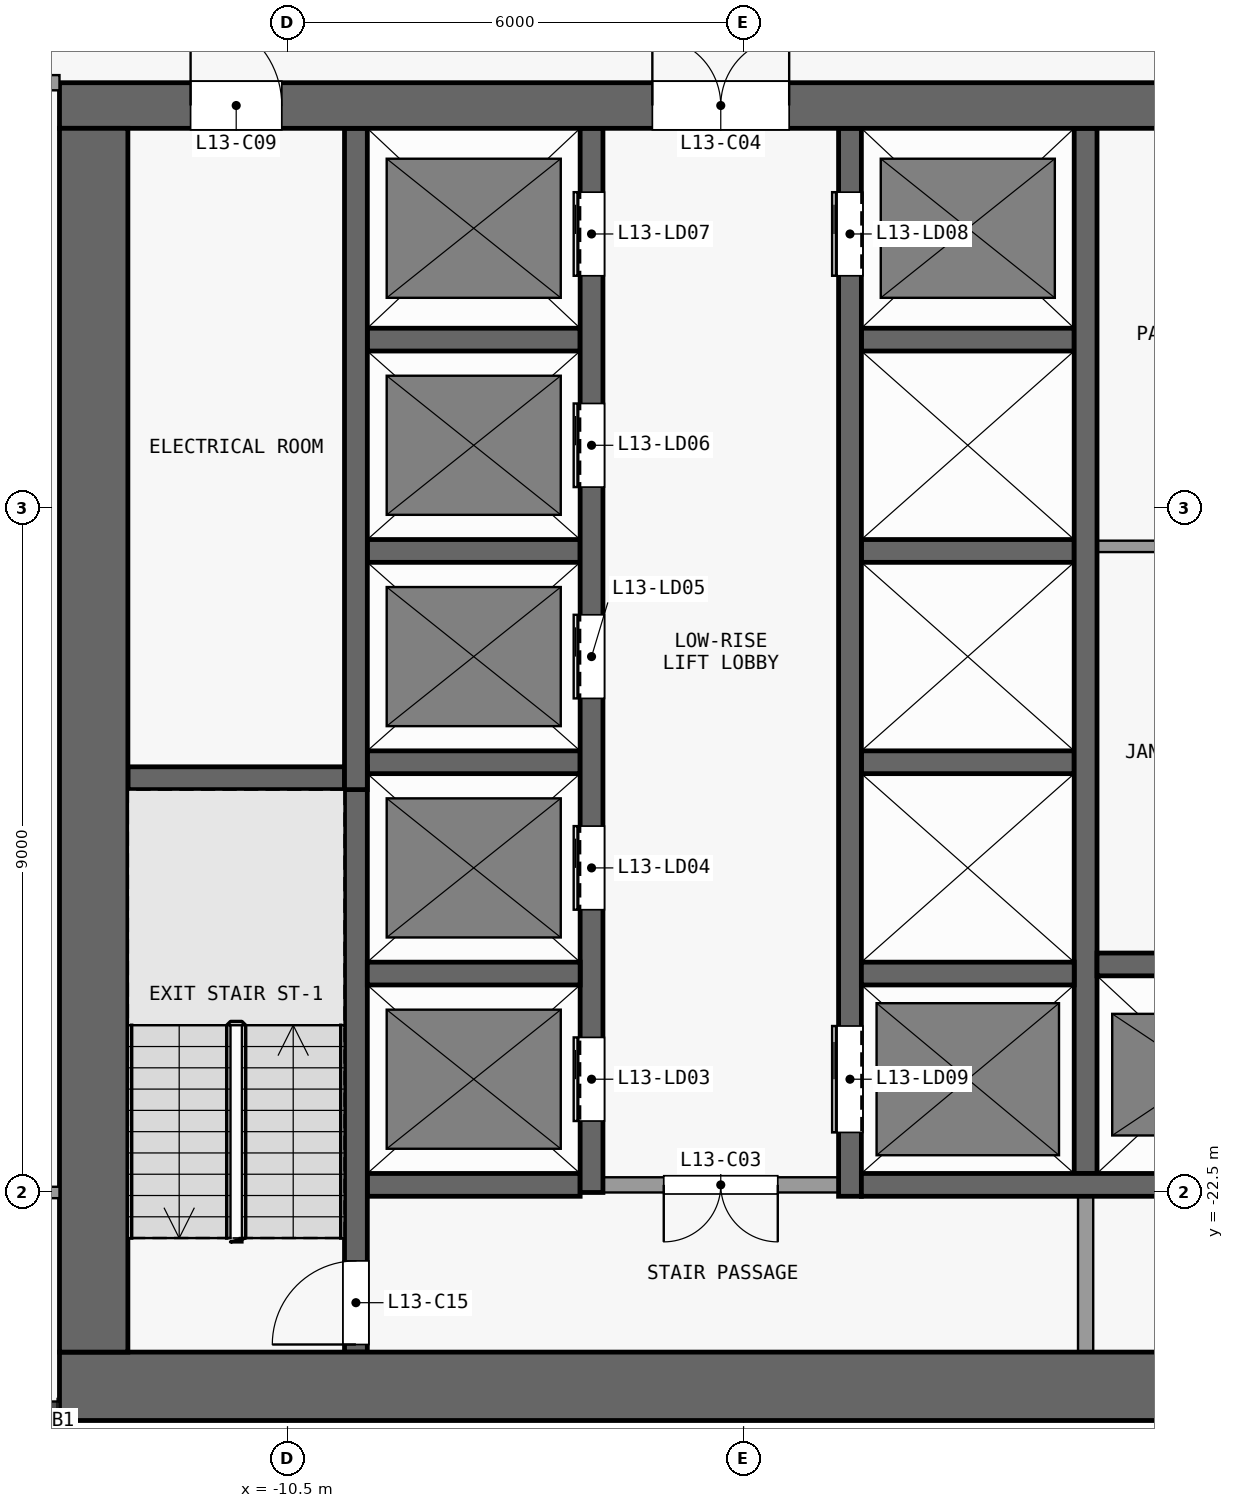
"""IFC4 building model, lengths in metres.
Left out: names, types, materials, properties, quantities, classifications, styles, units other than length and angle.
Written with IfcOpenShell. Run it as: python <this file> out.ifc"""

import sys

from ifc_helpers import new_model, si_unit, direction, frame, frame_2d, origin, place, context, subcontext, project, spatial, rectangle, extrude, element, fill, save


model = new_model("IFC4")
c1 = context("Model", 3, precision=1e-05, world=origin(), true_north=direction((0.0, 1.0)))
c2 = subcontext(c1, "Body", "Model", "MODEL_VIEW")
j1 = project(units=[si_unit("LENGTHUNIT", "METRE"), si_unit("PLANEANGLEUNIT", "RADIAN")], contexts=[c1])
p1 = place(None, origin())
s1 = spatial("IfcSite", under=j1, at=p1, CompositionType="ELEMENT")
p2 = place(p1, origin())
s2 = spatial("IfcBuilding", under=s1, at=p2, CompositionType="ELEMENT")
p3 = place(p2, frame((0.0, 0.0, 57.7)))
s3 = spatial("IfcBuildingStorey", under=s2, at=p3, CompositionType="ELEMENT", Elevation=57.7)
p4 = place(p3, frame((-13.5, -25.05, 0.0), z_axis=(0.0, 0.0, 1.0), x_axis=(1.0, 0.0, 0.0)))
e1 = element("IfcWall", 1, at=p4, inside=s3, PredefinedType="SHEAR", context=c2, shape_type="SweptSolid", body=[
    extrude(rectangle(XDim=27.0, YDim=0.9, at=frame_2d((13.5, 0.0))), origin(), (0.0, 0.0, 1.0), 3.3),
])
p5 = place(p3, frame((-13.5, -8.2, 0.0), z_axis=(0.0, 0.0, 1.0), x_axis=(1.0, 0.0, 0.0)))
e2 = element("IfcWall", 2, at=p5, inside=s3, PredefinedType="SHEAR", context=c2, shape_type="SweptSolid", body=[
    extrude(rectangle(XDim=27.0, YDim=0.6, at=frame_2d((13.5, 0.0))), origin(), (0.0, 0.0, 1.0), 3.3),
])
p6 = place(p5, frame((7.8, 0.0, 0.0)))
e3 = element("IfcOpeningElement", 3, at=p6, cuts=e2, PredefinedType="OPENING", context=c2, shape_type="SweptSolid", body=[
    extrude(rectangle(XDim=1.8, YDim=2.1, at=frame_2d((0.9, 1.05))), frame((0.0, 0.31, 0.0), z_axis=(0.0, -1.0, 0.0), x_axis=(1.0, 0.0, 0.0)), (0.0, 0.0, 1.0), 0.62),
])
p7 = place(p5, frame((17.4, 0.0, 0.0)))
e4 = element("IfcOpeningElement", 4, at=p7, cuts=e2, PredefinedType="OPENING", context=c2, shape_type="SweptSolid", body=[
    extrude(rectangle(XDim=1.8, YDim=2.1, at=frame_2d((0.9, 1.05))), frame((0.0, 0.31, 0.0), z_axis=(0.0, -1.0, 0.0), x_axis=(1.0, 0.0, 0.0)), (0.0, 0.0, 1.0), 0.62),
])
p8 = place(p5, frame((1.725, 0.0, 0.0)))
e5 = element("IfcOpeningElement", 5, at=p8, cuts=e2, PredefinedType="OPENING", context=c2, shape_type="SweptSolid", body=[
    extrude(rectangle(XDim=1.2, YDim=2.1, at=frame_2d((0.6, 1.05))), frame((0.0, 0.31, 0.0), z_axis=(0.0, -1.0, 0.0), x_axis=(1.0, 0.0, 0.0)), (0.0, 0.0, 1.0), 0.62),
])
p9 = place(p5, frame((23.375, 0.0, 0.0)))
e6 = element("IfcOpeningElement", 6, at=p9, cuts=e2, PredefinedType="OPENING", context=c2, shape_type="SweptSolid", body=[
    extrude(rectangle(XDim=0.9, YDim=2.1, at=frame_2d((0.45, 1.05))), frame((0.0, 0.31, 0.0), z_axis=(0.0, -1.0, 0.0), x_axis=(1.0, 0.0, 0.0)), (0.0, 0.0, 1.0), 0.62),
])
p10 = place(p3, frame((-13.05, -24.6, 0.0), z_axis=(0.0, 0.0, 1.0), x_axis=(0.0, 1.0, 0.0)))
e7 = element("IfcWall", 7, at=p10, inside=s3, PredefinedType="SHEAR", context=c2, shape_type="SweptSolid", body=[
    extrude(rectangle(XDim=16.1, YDim=0.9, at=frame_2d((8.05, 0.0))), origin(), (0.0, 0.0, 1.0), 3.3),
])
p11 = place(p3, frame((-9.45, -22.4, 0.0), z_axis=(0.0, 0.0, 1.0), x_axis=(1.0, 0.0, 0.0)))
e8 = element("IfcWall", 8, at=p11, inside=s3, PredefinedType="SHEAR", context=c2, shape_type="SweptSolid", body=[
    extrude(rectangle(XDim=2.8, YDim=0.3, at=frame_2d((1.4, 0.0))), origin(), (0.0, 0.0, 1.0), 3.3),
])
p12 = place(p3, frame((-3.25, -22.4, 0.0), z_axis=(0.0, 0.0, 1.0), x_axis=(-1.0, 0.0, 0.0)))
e9 = element("IfcWall", 9, at=p12, inside=s3, PredefinedType="PARTITIONING", context=c2, shape_type="SweptSolid", body=[
    extrude(rectangle(XDim=3.1, YDim=0.2, at=frame_2d((1.55, 0.0))), origin(), (0.0, 0.0, 1.0), 3.3),
])
p13 = place(p12, frame((0.8, 0.0, 0.0)))
e10 = element("IfcOpeningElement", 10, at=p13, cuts=e9, PredefinedType="OPENING", context=c2, shape_type="SweptSolid", body=[
    extrude(rectangle(XDim=1.5, YDim=2.1, at=frame_2d((0.75, 1.05))), frame((0.0, 0.11, 0.0), z_axis=(0.0, -1.0, 0.0), x_axis=(1.0, 0.0, 0.0)), (0.0, 0.0, 1.0), 0.22),
])
p14 = place(p3, frame((-2.95, -22.4, 0.0), z_axis=(0.0, 0.0, 1.0), x_axis=(1.0, 0.0, 0.0)))
e11 = element("IfcWall", 11, at=p14, inside=s3, PredefinedType="SHEAR", context=c2, shape_type="SweptSolid", body=[
    extrude(rectangle(XDim=6.2, YDim=0.3, at=frame_2d((3.1, 0.0))), origin(), (0.0, 0.0, 1.0), 3.3),
])
for number, where, z_axis, x_axis in (
    (12, (-9.45, -19.62, 0.0), (0.0, 0.0, 1.0), (1.0, 0.0, 0.0)),
    (13, (-2.95, -19.62, 0.0), (0.0, 0.0, 1.0), (1.0, 0.0, 0.0)),
):
    element("IfcWall", number, at=place(p3, frame(where, z_axis=z_axis, x_axis=x_axis)), inside=s3, PredefinedType="SHEAR", context=c2, shape_type="SweptSolid", body=[
        extrude(rectangle(XDim=2.8, YDim=0.3, at=frame_2d((1.4, 0.0))), origin(), (0.0, 0.0, 1.0), 3.3),
    ])
p15 = place(p3, frame((0.15, -19.5, 0.0), z_axis=(0.0, 0.0, 1.0), x_axis=(1.0, 0.0, 0.0)))
e14 = element("IfcWall", 14, at=p15, inside=s3, PredefinedType="SHEAR", context=c2, shape_type="SweptSolid", body=[
    extrude(rectangle(XDim=3.025, YDim=0.3, at=frame_2d((1.513, 0.0))), origin(), (0.0, 0.0, 1.0), 3.3),
])
p16 = place(p3, frame((-12.6, -17.05, 0.0), z_axis=(0.0, 0.0, 1.0), x_axis=(1.0, 0.0, 0.0)))
e15 = element("IfcWall", 15, at=p16, inside=s3, PredefinedType="SHEAR", context=c2, shape_type="SweptSolid", body=[
    extrude(rectangle(XDim=2.85, YDim=0.3, at=frame_2d((1.425, 0.0))), origin(), (0.0, 0.0, 1.0), 3.3),
])
for number, where, z_axis, x_axis in (
    (16, (-9.45, -16.84, 0.0), (0.0, 0.0, 1.0), (1.0, 0.0, 0.0)),
    (17, (-2.95, -16.84, 0.0), (0.0, 0.0, 1.0), (1.0, 0.0, 0.0)),
    (18, (-9.45, -14.06, 0.0), (0.0, 0.0, 1.0), (1.0, 0.0, 0.0)),
    (19, (-2.95, -14.06, 0.0), (0.0, 0.0, 1.0), (1.0, 0.0, 0.0)),
):
    element("IfcWall", number, at=place(p3, frame(where, z_axis=z_axis, x_axis=x_axis)), inside=s3, PredefinedType="SHEAR", context=c2, shape_type="SweptSolid", body=[
        extrude(rectangle(XDim=2.8, YDim=0.3, at=frame_2d((1.4, 0.0))), origin(), (0.0, 0.0, 1.0), 3.3),
    ])
p17 = place(p3, frame((0.15, -14.0, 0.0), z_axis=(0.0, 0.0, 1.0), x_axis=(1.0, 0.0, 0.0)))
e20 = element("IfcWall", 20, at=p17, inside=s3, PredefinedType="PARTITIONING", context=c2, shape_type="SweptSolid", body=[
    extrude(rectangle(XDim=2.875, YDim=0.15, at=frame_2d((1.438, 0.0))), origin(), (0.0, 0.0, 1.0), 3.3),
])
for number, where, z_axis, x_axis in (
    (21, (-9.45, -11.28, 0.0), (0.0, 0.0, 1.0), (1.0, 0.0, 0.0)),
    (22, (-2.95, -11.28, 0.0), (0.0, 0.0, 1.0), (1.0, 0.0, 0.0)),
):
    element("IfcWall", number, at=place(p3, frame(where, z_axis=z_axis, x_axis=x_axis)), inside=s3, PredefinedType="SHEAR", context=c2, shape_type="SweptSolid", body=[
        extrude(rectangle(XDim=2.8, YDim=0.3, at=frame_2d((1.4, 0.0))), origin(), (0.0, 0.0, 1.0), 3.3),
    ])
p18 = place(p3, frame((-9.6, -24.6, 0.0), z_axis=(0.0, 0.0, 1.0), x_axis=(0.0, 1.0, 0.0)))
e23 = element("IfcWall", 23, at=p18, inside=s3, PredefinedType="SHEAR", context=c2, shape_type="SweptSolid", body=[
    extrude(rectangle(XDim=7.7, YDim=0.3, at=frame_2d((3.85, 0.0))), origin(), (0.0, 0.0, 1.0), 3.3),
])
p19 = place(p18, frame((0.1, 0.0, 0.0)))
e24 = element("IfcOpeningElement", 24, at=p19, cuts=e23, PredefinedType="OPENING", context=c2, shape_type="SweptSolid", body=[
    extrude(rectangle(XDim=1.1, YDim=2.1, at=frame_2d((0.55, 1.05))), frame((0.0, 0.16, 0.0), z_axis=(0.0, -1.0, 0.0), x_axis=(1.0, 0.0, 0.0)), (0.0, 0.0, 1.0), 0.32),
])
p20 = place(p3, frame((-9.6, -17.2, 0.0), z_axis=(0.0, 0.0, 1.0), x_axis=(0.0, 1.0, 0.0)))
e25 = element("IfcWall", 25, at=p20, inside=s3, PredefinedType="SHEAR", context=c2, shape_type="SweptSolid", body=[
    extrude(rectangle(XDim=8.7, YDim=0.3, at=frame_2d((4.35, 0.0))), origin(), (0.0, 0.0, 1.0), 3.3),
])
p21 = place(p3, frame((-6.5, -22.5, 0.0), z_axis=(0.0, 0.0, 1.0), x_axis=(0.0, 1.0, 0.0)))
e26 = element("IfcWall", 26, at=p21, inside=s3, PredefinedType="SHEAR", context=c2, shape_type="SweptSolid", body=[
    extrude(rectangle(XDim=14.0, YDim=0.3, at=frame_2d((7.0, 0.0))), origin(), (0.0, 0.0, 1.0), 3.3),
])
p22 = place(p21, frame((0.94, 0.0, 0.0)))
e27 = element("IfcOpeningElement", 27, at=p22, cuts=e26, PredefinedType="OPENING", context=c2, shape_type="SweptSolid", body=[
    extrude(rectangle(XDim=1.1, YDim=2.1, at=frame_2d((0.55, 1.05))), frame((0.0, 0.16, 0.0), z_axis=(0.0, -1.0, 0.0), x_axis=(1.0, 0.0, 0.0)), (0.0, 0.0, 1.0), 0.32),
])
p23 = place(p21, frame((3.72, 0.0, 0.0)))
e28 = element("IfcOpeningElement", 28, at=p23, cuts=e26, PredefinedType="OPENING", context=c2, shape_type="SweptSolid", body=[
    extrude(rectangle(XDim=1.1, YDim=2.1, at=frame_2d((0.55, 1.05))), frame((0.0, 0.16, 0.0), z_axis=(0.0, -1.0, 0.0), x_axis=(1.0, 0.0, 0.0)), (0.0, 0.0, 1.0), 0.32),
])
p24 = place(p21, frame((6.5, 0.0, 0.0)))
e29 = element("IfcOpeningElement", 29, at=p24, cuts=e26, PredefinedType="OPENING", context=c2, shape_type="SweptSolid", body=[
    extrude(rectangle(XDim=1.1, YDim=2.1, at=frame_2d((0.55, 1.05))), frame((0.0, 0.16, 0.0), z_axis=(0.0, -1.0, 0.0), x_axis=(1.0, 0.0, 0.0)), (0.0, 0.0, 1.0), 0.32),
])
p25 = place(p21, frame((9.28, 0.0, 0.0)))
e30 = element("IfcOpeningElement", 30, at=p25, cuts=e26, PredefinedType="OPENING", context=c2, shape_type="SweptSolid", body=[
    extrude(rectangle(XDim=1.1, YDim=2.1, at=frame_2d((0.55, 1.05))), frame((0.0, 0.16, 0.0), z_axis=(0.0, -1.0, 0.0), x_axis=(1.0, 0.0, 0.0)), (0.0, 0.0, 1.0), 0.32),
])
p26 = place(p21, frame((12.06, 0.0, 0.0)))
e31 = element("IfcOpeningElement", 31, at=p26, cuts=e26, PredefinedType="OPENING", context=c2, shape_type="SweptSolid", body=[
    extrude(rectangle(XDim=1.1, YDim=2.1, at=frame_2d((0.55, 1.05))), frame((0.0, 0.16, 0.0), z_axis=(0.0, -1.0, 0.0), x_axis=(1.0, 0.0, 0.0)), (0.0, 0.0, 1.0), 0.32),
])
p27 = place(p3, frame((-3.1, -22.55, 0.0), z_axis=(0.0, 0.0, 1.0), x_axis=(0.0, 1.0, 0.0)))
e32 = element("IfcWall", 32, at=p27, inside=s3, PredefinedType="SHEAR", context=c2, shape_type="SweptSolid", body=[
    extrude(rectangle(XDim=14.05, YDim=0.3, at=frame_2d((7.025, 0.0))), origin(), (0.0, 0.0, 1.0), 3.3),
])
p28 = place(p27, frame((12.11, 0.0, 0.0)))
e33 = element("IfcOpeningElement", 33, at=p28, cuts=e32, PredefinedType="OPENING", context=c2, shape_type="SweptSolid", body=[
    extrude(rectangle(XDim=1.1, YDim=2.1, at=frame_2d((0.55, 1.05))), frame((0.0, 0.16, 0.0), z_axis=(0.0, -1.0, 0.0), x_axis=(1.0, 0.0, 0.0)), (0.0, 0.0, 1.0), 0.32),
])
p29 = place(p27, frame((0.84, 0.0, 0.0)))
e34 = element("IfcOpeningElement", 34, at=p29, cuts=e32, PredefinedType="OPENING", context=c2, shape_type="SweptSolid", body=[
    extrude(rectangle(XDim=1.4, YDim=2.1, at=frame_2d((0.7, 1.05))), frame((0.0, 0.16, 0.0), z_axis=(0.0, -1.0, 0.0), x_axis=(1.0, 0.0, 0.0)), (0.0, 0.0, 1.0), 0.32),
])
p30 = place(p3, frame((0.0, -24.6, 0.0), z_axis=(0.0, 0.0, 1.0), x_axis=(0.0, 1.0, 0.0)))
e35 = element("IfcWall", 35, at=p30, inside=s3, PredefinedType="PARTITIONING", context=c2, shape_type="SweptSolid", body=[
    extrude(rectangle(XDim=2.05, YDim=0.2, at=frame_2d((1.025, 0.0))), origin(), (0.0, 0.0, 1.0), 3.3),
])
p31 = place(p3, frame((0.0, -22.25, 0.0), z_axis=(0.0, 0.0, 1.0), x_axis=(0.0, 1.0, 0.0)))
e36 = element("IfcWall", 36, at=p31, inside=s3, PredefinedType="SHEAR", context=c2, shape_type="SweptSolid", body=[
    extrude(rectangle(XDim=13.75, YDim=0.3, at=frame_2d((6.875, 0.0))), origin(), (0.0, 0.0, 1.0), 3.3),
])
p32 = place(p3, frame((-16.425, -22.5, 0.0), z_axis=(0.0, 0.0, 1.0), x_axis=(1.0, 0.0, 0.0)))
e37 = element("IfcWall", 37, at=p32, inside=s3, PredefinedType="PARTITIONING", context=c2, shape_type="SweptSolid", body=[
    extrude(rectangle(XDim=2.925, YDim=0.15, at=frame_2d((1.462, 0.0))), origin(), (0.0, 0.0, 1.0), 3.3),
])
p33 = place(p32, frame((1.0, 0.0, 0.0)))
e38 = element("IfcOpeningElement", 38, at=p33, cuts=e37, PredefinedType="OPENING", context=c2, shape_type="SweptSolid", body=[
    extrude(rectangle(XDim=0.9, YDim=2.1, at=frame_2d((0.45, 1.05))), frame((0.0, 0.085, 0.0), z_axis=(0.0, -1.0, 0.0), x_axis=(1.0, 0.0, 0.0)), (0.0, 0.0, 1.0), 0.17),
])
p34 = place(p3, frame((-25.25, -7.9, 0.0), z_axis=(0.0, 0.0, 1.0), x_axis=(1.0, 0.0, 0.0)))
e39 = element("IfcWall", 39, at=p34, inside=s3, PredefinedType="PARTITIONING", context=c2, shape_type="SweptSolid", body=[
    extrude(rectangle(XDim=11.75, YDim=0.2, at=frame_2d((5.875, 0.0))), origin(), (0.0, 0.0, 1.0), 3.3),
])
p35 = place(p34, frame((9.75, 0.0, 0.0)))
e40 = element("IfcOpeningElement", 40, at=p35, cuts=e39, PredefinedType="OPENING", context=c2, shape_type="SweptSolid", body=[
    extrude(rectangle(XDim=1.0, YDim=2.1, at=frame_2d((0.5, 1.05))), frame((0.0, 0.11, 0.0), z_axis=(0.0, -1.0, 0.0), x_axis=(1.0, 0.0, 0.0)), (0.0, 0.0, 1.0), 0.22),
])
p36 = place(p22, origin())
e41 = element("IfcDoor", 41, at=p36, inside=s3, OperationType="DOUBLE_DOOR_SLIDING", PredefinedType="DOOR", context=c2, shape_type="SweptSolid", body=[
    extrude(rectangle(XDim=1.1, YDim=2.1, at=frame_2d((0.55, 1.05))), frame((0.0, 0.025, 0.0), z_axis=(0.0, -1.0, 0.0), x_axis=(1.0, 0.0, 0.0)), (0.0, 0.0, 1.0), 0.05),
])
fill(e27, e41)
p37 = place(p23, origin())
e42 = element("IfcDoor", 42, at=p37, inside=s3, OperationType="DOUBLE_DOOR_SLIDING", PredefinedType="DOOR", context=c2, shape_type="SweptSolid", body=[
    extrude(rectangle(XDim=1.1, YDim=2.1, at=frame_2d((0.55, 1.05))), frame((0.0, 0.025, 0.0), z_axis=(0.0, -1.0, 0.0), x_axis=(1.0, 0.0, 0.0)), (0.0, 0.0, 1.0), 0.05),
])
fill(e28, e42)
p38 = place(p24, origin())
e43 = element("IfcDoor", 43, at=p38, inside=s3, OperationType="DOUBLE_DOOR_SLIDING", PredefinedType="DOOR", context=c2, shape_type="SweptSolid", body=[
    extrude(rectangle(XDim=1.1, YDim=2.1, at=frame_2d((0.55, 1.05))), frame((0.0, 0.025, 0.0), z_axis=(0.0, -1.0, 0.0), x_axis=(1.0, 0.0, 0.0)), (0.0, 0.0, 1.0), 0.05),
])
fill(e29, e43)
p39 = place(p25, origin())
e44 = element("IfcDoor", 44, at=p39, inside=s3, OperationType="DOUBLE_DOOR_SLIDING", PredefinedType="DOOR", context=c2, shape_type="SweptSolid", body=[
    extrude(rectangle(XDim=1.1, YDim=2.1, at=frame_2d((0.55, 1.05))), frame((0.0, 0.025, 0.0), z_axis=(0.0, -1.0, 0.0), x_axis=(1.0, 0.0, 0.0)), (0.0, 0.0, 1.0), 0.05),
])
fill(e30, e44)
p40 = place(p26, origin())
e45 = element("IfcDoor", 45, at=p40, inside=s3, OperationType="DOUBLE_DOOR_SLIDING", PredefinedType="DOOR", context=c2, shape_type="SweptSolid", body=[
    extrude(rectangle(XDim=1.1, YDim=2.1, at=frame_2d((0.55, 1.05))), frame((0.0, 0.025, 0.0), z_axis=(0.0, -1.0, 0.0), x_axis=(1.0, 0.0, 0.0)), (0.0, 0.0, 1.0), 0.05),
])
fill(e31, e45)
p41 = place(p28, origin())
e46 = element("IfcDoor", 46, at=p41, inside=s3, OperationType="DOUBLE_DOOR_SLIDING", PredefinedType="DOOR", context=c2, shape_type="SweptSolid", body=[
    extrude(rectangle(XDim=1.1, YDim=2.1, at=frame_2d((0.55, 1.05))), frame((0.0, 0.025, 0.0), z_axis=(0.0, -1.0, 0.0), x_axis=(1.0, 0.0, 0.0)), (0.0, 0.0, 1.0), 0.05),
])
fill(e33, e46)
p42 = place(p29, origin())
e47 = element("IfcDoor", 47, at=p42, inside=s3, OperationType="DOUBLE_DOOR_SLIDING", PredefinedType="DOOR", context=c2, shape_type="SweptSolid", body=[
    extrude(rectangle(XDim=1.4, YDim=2.1, at=frame_2d((0.7, 1.05))), frame((0.0, 0.025, 0.0), z_axis=(0.0, -1.0, 0.0), x_axis=(1.0, 0.0, 0.0)), (0.0, 0.0, 1.0), 0.05),
])
fill(e34, e47)
p43 = place(p13, origin())
e48 = element("IfcDoor", 48, at=p43, inside=s3, OperationType="DOUBLE_DOOR_SINGLE_SWING", PredefinedType="DOOR", context=c2, shape_type="SweptSolid", body=[
    extrude(rectangle(XDim=1.5, YDim=2.1, at=frame_2d((0.75, 1.05))), frame((0.0, 0.025, 0.0), z_axis=(0.0, -1.0, 0.0), x_axis=(1.0, 0.0, 0.0)), (0.0, 0.0, 1.0), 0.05),
])
fill(e10, e48)
p44 = place(p6, origin())
e49 = element("IfcDoor", 49, at=p44, inside=s3, OperationType="DOUBLE_DOOR_SINGLE_SWING", PredefinedType="DOOR", context=c2, shape_type="SweptSolid", body=[
    extrude(rectangle(XDim=1.8, YDim=2.1, at=frame_2d((0.9, 1.05))), frame((0.0, 0.025, 0.0), z_axis=(0.0, -1.0, 0.0), x_axis=(1.0, 0.0, 0.0)), (0.0, 0.0, 1.0), 0.05),
])
fill(e3, e49)
p45 = place(p8, origin())
e50 = element("IfcDoor", 50, at=p45, inside=s3, OperationType="SINGLE_SWING_LEFT", PredefinedType="DOOR", context=c2, shape_type="SweptSolid", body=[
    extrude(rectangle(XDim=1.2, YDim=2.1, at=frame_2d((0.6, 1.05))), frame((0.0, 0.025, 0.0), z_axis=(0.0, -1.0, 0.0), x_axis=(1.0, 0.0, 0.0)), (0.0, 0.0, 1.0), 0.05),
])
fill(e5, e50)
p46 = place(p19, origin())
e51 = element("IfcDoor", 51, at=p46, inside=s3, OperationType="SINGLE_SWING_LEFT", PredefinedType="DOOR", context=c2, shape_type="SweptSolid", body=[
    extrude(rectangle(XDim=1.1, YDim=2.1, at=frame_2d((0.55, 1.05))), frame((0.0, 0.025, 0.0), z_axis=(0.0, -1.0, 0.0), x_axis=(1.0, 0.0, 0.0)), (0.0, 0.0, 1.0), 0.05),
])
fill(e24, e51)
save(model, sys.argv[1])
